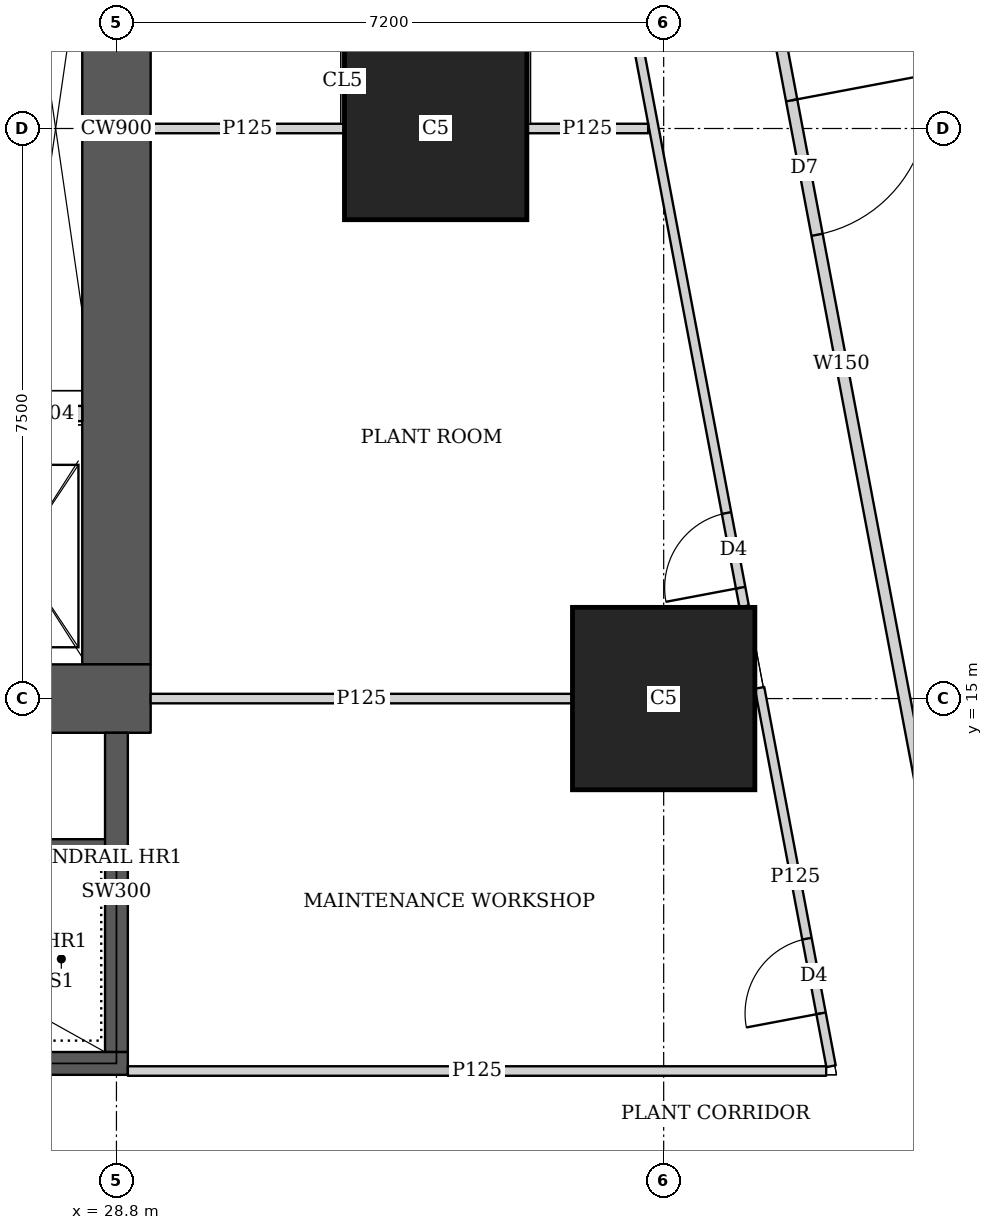
"""IFC4 building model, lengths in metres.
Left out: names, types, materials, properties, quantities, classifications, styles, units other than length and angle.
Written with IfcOpenShell. Run it as: python <this file> out.ifc"""

import sys

from ifc_helpers import new_model, si_unit, direction, frame, frame_2d, origin, origin_2d, place, context, subcontext, project, spatial, rectangle, extrude, element, fill, save


model = new_model("IFC4")
c1 = context("Model", 3, precision=1e-05, world=origin(), true_north=direction((0.0, 1.0)))
c2 = subcontext(c1, "Body", "Model", "MODEL_VIEW")
j1 = project(units=[si_unit("LENGTHUNIT", "METRE"), si_unit("PLANEANGLEUNIT", "RADIAN")], contexts=[c1])
p1 = place(None, origin())
s1 = spatial("IfcSite", under=j1, at=p1, CompositionType="ELEMENT")
p2 = place(p1, origin())
s2 = spatial("IfcBuilding", under=s1, at=p2, CompositionType="ELEMENT")
p3 = place(p2, frame((0.0, 0.0, 14.6)))
s3 = spatial("IfcBuildingStorey", under=s2, at=p3, CompositionType="ELEMENT", Elevation=14.6)
for number, where, z_axis, x_axis in (
    (1, (36.0, 15.0, 0.0), (0.0, 0.0, 1.0), (1.0, 0.0, 0.0)),
    (2, (33.0, 22.5, 0.0), (0.0, 0.0, 1.0), (1.0, 0.0, 0.0)),
):
    element("IfcColumn", number, at=place(p3, frame(where, z_axis=z_axis, x_axis=x_axis)), inside=s3, PredefinedType="COLUMN", context=c2, shape_type="SweptSolid", body=[
        extrude(rectangle(XDim=2.4, YDim=2.4, at=origin_2d()), origin(), (0.0, 0.0, 1.0), 5.4),
    ])
p4 = place(p3, frame((13.95, 15.0, 0.0), z_axis=(0.0, 0.0, 1.0), x_axis=(1.0, 0.0, 0.0)))
e3 = element("IfcWall", 3, at=p4, inside=s3, PredefinedType="SHEAR", context=c2, shape_type="SweptSolid", body=[
    extrude(rectangle(XDim=15.3, YDim=0.9, at=frame_2d((7.65, 0.0))), origin(), (0.0, 0.0, 1.0), 5.4),
])
p5 = place(p4, frame((4.45, 0.0, 0.0)))
e4 = element("IfcOpeningElement", 4, at=p5, cuts=e3, PredefinedType="OPENING", context=c2, shape_type="SweptSolid", body=[
    extrude(rectangle(XDim=1.8, YDim=2.1, at=frame_2d((0.9, 1.05))), frame((0.0, 0.46, 0.0), z_axis=(0.0, -1.0, 0.0), x_axis=(1.0, 0.0, 0.0)), (0.0, 0.0, 1.0), 0.92),
])
p6 = place(p4, frame((10.7, 0.0, 0.0)))
e5 = element("IfcOpeningElement", 5, at=p6, cuts=e3, PredefinedType="OPENING", context=c2, shape_type="SweptSolid", body=[
    extrude(rectangle(XDim=1.1, YDim=2.1, at=frame_2d((0.55, 1.05))), frame((0.0, 0.46, 0.0), z_axis=(0.0, -1.0, 0.0), x_axis=(1.0, 0.0, 0.0)), (0.0, 0.0, 1.0), 0.92),
])
p7 = place(p3, frame((28.8, 15.45, 0.0), z_axis=(0.0, 0.0, 1.0), x_axis=(0.0, 1.0, 0.0)))
e6 = element("IfcWall", 6, at=p7, inside=s3, PredefinedType="SHEAR", context=c2, shape_type="SweptSolid", body=[
    extrude(rectangle(XDim=14.1, YDim=0.9, at=frame_2d((7.05, 0.0))), origin(), (0.0, 0.0, 1.0), 5.4),
])
p8 = place(p3, frame((21.45, 10.2, 0.0), z_axis=(0.0, 0.0, 1.0), x_axis=(1.0, 0.0, 0.0)))
e7 = element("IfcWall", 7, at=p8, inside=s3, PredefinedType="SHEAR", context=c2, shape_type="SweptSolid", body=[
    extrude(rectangle(XDim=7.5, YDim=0.3, at=frame_2d((3.75, 0.0))), origin(), (0.0, 0.0, 1.0), 5.4),
])
p9 = place(p8, frame((0.5, 0.0, 0.0)))
e8 = element("IfcOpeningElement", 8, at=p9, cuts=e7, PredefinedType="OPENING", context=c2, shape_type="SweptSolid", body=[
    extrude(rectangle(XDim=1.1, YDim=2.1, at=frame_2d((0.55, 1.05))), frame((0.0, 0.16, 0.0), z_axis=(0.0, -1.0, 0.0), x_axis=(1.0, 0.0, 0.0)), (0.0, 0.0, 1.0), 0.32),
])
p10 = place(p3, frame((28.8, 10.35, 0.0), z_axis=(0.0, 0.0, 1.0), x_axis=(0.0, 1.0, 0.0)))
e9 = element("IfcWall", 9, at=p10, inside=s3, PredefinedType="SHEAR", context=c2, shape_type="SweptSolid", body=[
    extrude(rectangle(XDim=4.2, YDim=0.3, at=frame_2d((2.1, 0.0))), origin(), (0.0, 0.0, 1.0), 5.4),
])
p11 = place(p3, frame((35.15, 36.285, 0.0), z_axis=(0.0, 0.0, 1.0), x_axis=(0.185613484682, -0.982622834207, 0.0)))
e10 = element("IfcWall", 10, at=p11, inside=s3, PredefinedType="SOLIDWALL", context=c2, shape_type="SweptSolid", body=[
    extrude(rectangle(XDim=34.351, YDim=0.15, at=frame_2d((17.175, 0.0))), origin(), (0.0, 0.0, 1.0), 3.5),
])
p12 = place(p11, frame((13.652, 0.0, 0.0)))
e11 = element("IfcOpeningElement", 11, at=p12, cuts=e10, PredefinedType="OPENING", context=c2, shape_type="SweptSolid", body=[
    extrude(rectangle(XDim=1.8, YDim=2.4, at=frame_2d((0.9, 1.2))), frame((0.0, 0.085, 0.0), z_axis=(0.0, -1.0, 0.0), x_axis=(1.0, 0.0, 0.0)), (0.0, 0.0, 1.0), 0.17),
])
p13 = place(p3, frame((28.95, 10.1, 0.0), z_axis=(0.0, 0.0, 1.0), x_axis=(1.0, 0.0, 0.0)))
e12 = element("IfcWall", 12, at=p13, inside=s3, PredefinedType="PARTITIONING", context=c2, shape_type="SweptSolid", body=[
    extrude(rectangle(XDim=9.188, YDim=0.125, at=frame_2d((4.594, 0.0))), origin(), (0.0, 0.0, 1.0), 3.1),
])
p14 = place(p3, frame((38.202, 10.163, 0.0), z_axis=(0.0, 0.0, 1.0), x_axis=(-0.185539561605, 0.982636795097, 0.0)))
e13 = element("IfcWall", 13, at=p14, inside=s3, PredefinedType="PARTITIONING", context=c2, shape_type="SweptSolid", body=[
    extrude(rectangle(XDim=5.066, YDim=0.125, at=frame_2d((2.533, 0.0))), origin(), (0.0, 0.0, 1.0), 3.5),
])
p15 = place(p14, frame((0.708, 0.0, 0.0)))
e14 = element("IfcOpeningElement", 14, at=p15, cuts=e13, PredefinedType="OPENING", context=c2, shape_type="SweptSolid", body=[
    extrude(rectangle(XDim=1.0, YDim=2.1, at=frame_2d((0.5, 1.05))), frame((0.0, 0.073, 0.0), z_axis=(0.0, -1.0, 0.0), x_axis=(1.0, 0.0, 0.0)), (0.0, 0.0, 1.0), 0.145),
])
p16 = place(p3, frame((37.059, 16.213, 0.0), z_axis=(0.0, 0.0, 1.0), x_axis=(-0.185585225745, 0.982628171785, 0.0)))
e15 = element("IfcWall", 15, at=p16, inside=s3, PredefinedType="PARTITIONING", context=c2, shape_type="SweptSolid", body=[
    extrude(rectangle(XDim=15.072, YDim=0.125, at=frame_2d((7.536, 0.0))), origin(), (0.0, 0.0, 1.0), 3.5),
])
p17 = place(p16, frame((0.25, 0.0, 0.0)))
e16 = element("IfcOpeningElement", 16, at=p17, cuts=e15, PredefinedType="OPENING", context=c2, shape_type="SweptSolid", body=[
    extrude(rectangle(XDim=1.0, YDim=2.1, at=frame_2d((0.5, 1.05))), frame((0.0, 0.073, 0.0), z_axis=(0.0, -1.0, 0.0), x_axis=(1.0, 0.0, 0.0)), (0.0, 0.0, 1.0), 0.145),
])
p18 = place(p16, frame((7.806, 0.0, 0.0)))
e17 = element("IfcOpeningElement", 17, at=p18, cuts=e15, PredefinedType="OPENING", context=c2, shape_type="SweptSolid", body=[
    extrude(rectangle(XDim=1.0, YDim=2.1, at=frame_2d((0.5, 1.05))), frame((0.0, 0.073, 0.0), z_axis=(0.0, -1.0, 0.0), x_axis=(1.0, 0.0, 0.0)), (0.0, 0.0, 1.0), 0.145),
])
p19 = place(p16, frame((11.623, 0.0, 0.0)))
e18 = element("IfcOpeningElement", 18, at=p19, cuts=e15, PredefinedType="OPENING", context=c2, shape_type="SweptSolid", body=[
    extrude(rectangle(XDim=1.0, YDim=2.1, at=frame_2d((0.5, 1.05))), frame((0.0, 0.073, 0.0), z_axis=(0.0, -1.0, 0.0), x_axis=(1.0, 0.0, 0.0)), (0.0, 0.0, 1.0), 0.145),
])
p20 = place(p3, frame((29.25, 15.0, 0.0), z_axis=(0.0, 0.0, 1.0), x_axis=(1.0, 0.0, 0.0)))
e19 = element("IfcWall", 19, at=p20, inside=s3, PredefinedType="PARTITIONING", context=c2, shape_type="SweptSolid", body=[
    extrude(rectangle(XDim=5.549, YDim=0.125, at=frame_2d((2.774, 0.0))), origin(), (0.0, 0.0, 1.0), 5.1),
])
p21 = place(p3, frame((29.25, 22.5, 0.0), z_axis=(0.0, 0.0, 1.0), x_axis=(1.0, 0.0, 0.0)))
e20 = element("IfcWall", 20, at=p21, inside=s3, PredefinedType="PARTITIONING", context=c2, shape_type="SweptSolid", body=[
    extrude(rectangle(XDim=2.549, YDim=0.125, at=frame_2d((1.274, 0.0))), origin(), (0.0, 0.0, 1.0), 3.5),
])
p22 = place(p3, frame((34.201, 22.5, 0.0), z_axis=(0.0, 0.0, 1.0), x_axis=(1.0, 0.0, 0.0)))
e21 = element("IfcWall", 21, at=p22, inside=s3, PredefinedType="PARTITIONING", context=c2, shape_type="SweptSolid", body=[
    extrude(rectangle(XDim=1.595, YDim=0.125, at=frame_2d((0.797, 0.0))), origin(), (0.0, 0.0, 1.0), 3.5),
])
p23 = place(p3, frame((23.0, 13.05, 0.0), z_axis=(0.0, 0.0, 1.0), x_axis=(1.0, 0.0, 0.0)))
e22 = element("IfcWall", 22, at=p23, inside=s3, PredefinedType="SHEAR", context=c2, shape_type="SweptSolid", body=[
    extrude(rectangle(XDim=5.8, YDim=0.2, at=frame_2d((2.9, 0.0))), origin(), (0.0, 0.0, 1.0), 5.4),
])
p24 = place(p3, frame((27.4, 18.75, 0.0), z_axis=(0.0, 0.0, 1.0), x_axis=(1.0, 0.0, 0.0)))
e23 = element("IfcWall", 23, at=p24, inside=s3, PredefinedType="SOLIDWALL", context=c2, shape_type="SweptSolid", body=[
    extrude(rectangle(XDim=0.95, YDim=0.2, at=frame_2d((0.475, 0.0))), origin(), (0.0, 0.0, 1.0), 5.1),
])
p25 = place(p12, origin())
e24 = element("IfcDoor", 24, at=p25, inside=s3, OperationType="DOUBLE_DOOR_SINGLE_SWING", PredefinedType="DOOR", context=c2, shape_type="SweptSolid", body=[
    extrude(rectangle(XDim=1.8, YDim=2.4, at=frame_2d((0.9, 1.2))), frame((0.0, 0.025, 0.0), z_axis=(0.0, -1.0, 0.0), x_axis=(1.0, 0.0, 0.0)), (0.0, 0.0, 1.0), 0.05),
])
fill(e11, e24)
p26 = place(p15, origin())
e25 = element("IfcDoor", 25, at=p26, inside=s3, OperationType="SINGLE_SWING_LEFT", PredefinedType="DOOR", context=c2, shape_type="SweptSolid", body=[
    extrude(rectangle(XDim=1.0, YDim=2.1, at=frame_2d((0.5, 1.05))), frame((0.0, 0.025, 0.0), z_axis=(0.0, -1.0, 0.0), x_axis=(1.0, 0.0, 0.0)), (0.0, 0.0, 1.0), 0.05),
])
fill(e14, e25)
p27 = place(p17, origin())
e26 = element("IfcDoor", 26, at=p27, inside=s3, OperationType="SINGLE_SWING_LEFT", PredefinedType="DOOR", context=c2, shape_type="SweptSolid", body=[
    extrude(rectangle(XDim=1.0, YDim=2.1, at=frame_2d((0.5, 1.05))), frame((0.0, 0.025, 0.0), z_axis=(0.0, -1.0, 0.0), x_axis=(1.0, 0.0, 0.0)), (0.0, 0.0, 1.0), 0.05),
])
fill(e16, e26)
save(model, sys.argv[1])
